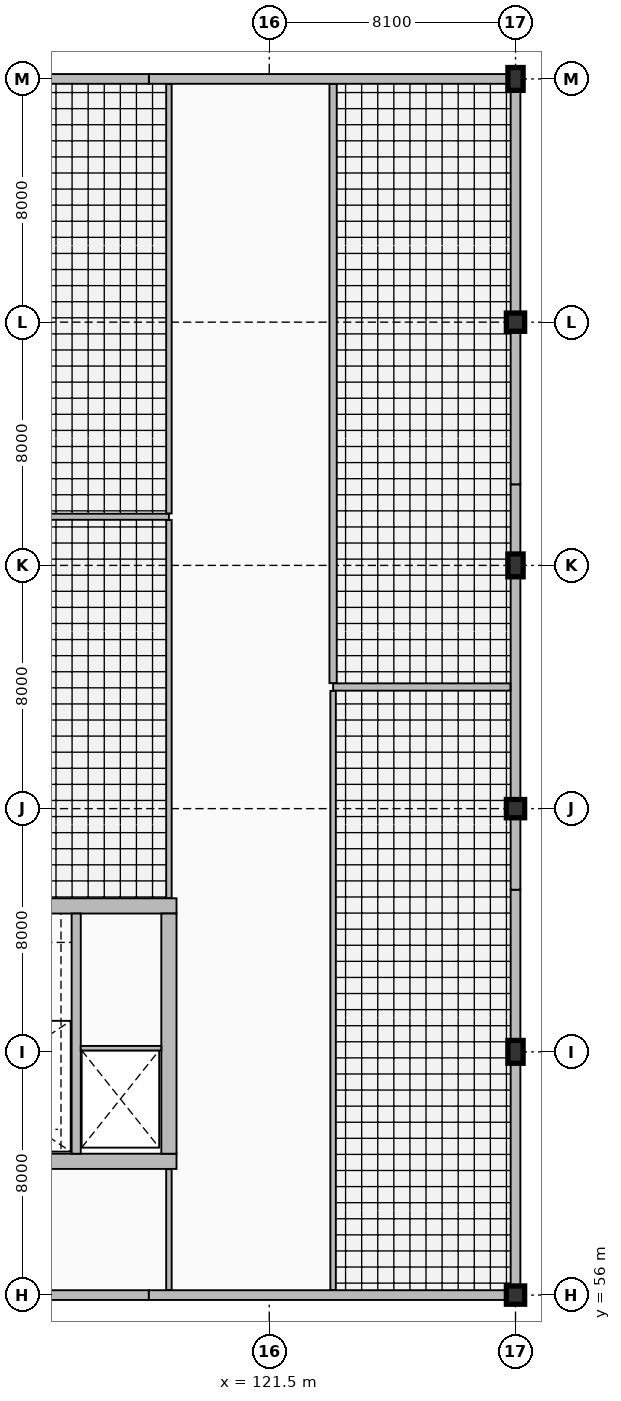
"""IFC4 building model, lengths in metres.
Left out: names, types, materials, properties, quantities, classifications, styles, units other than length and angle.
Written with IfcOpenShell. Run it as: python <this file> out.ifc"""

import sys

from ifc_helpers import new_model, si_unit, direction, frame, frame_2d, origin, origin_2d, place, context, subcontext, project, spatial, rectangle, extrude, element, fill, save


model = new_model("IFC4")
c1 = context("Model", 3, precision=1e-05, world=origin(), true_north=direction((0.0, 1.0)))
c2 = subcontext(c1, "Body", "Model", "MODEL_VIEW")
j1 = project(units=[si_unit("LENGTHUNIT", "METRE"), si_unit("PLANEANGLEUNIT", "RADIAN")], contexts=[c1])
p1 = place(None, origin())
s1 = spatial("IfcSite", under=j1, at=p1, CompositionType="ELEMENT")
p2 = place(p1, origin())
s2 = spatial("IfcBuilding", under=s1, at=p2, CompositionType="ELEMENT")
p3 = place(p2, frame((0.0, 0.0, 10.2)))
s3 = spatial("IfcBuildingStorey", under=s2, at=p3, CompositionType="ELEMENT", Elevation=10.2)
p4 = place(p3, frame((105.48, 60.4, 0.0), z_axis=(0.0, 0.0, 1.0), x_axis=(1.0, 0.0, 0.0)))
e1 = element("IfcWall", 1, at=p4, inside=s3, PredefinedType="SHEAR", context=c2, shape_type="SweptSolid", body=[
    extrude(rectangle(XDim=12.97, YDim=0.5, at=frame_2d((6.485, 0.0))), origin(), (0.0, 0.0, 1.0), 4.5),
])
p5 = place(p4, frame((1.27, 0.0, 0.0)))
e2 = element("IfcOpeningElement", 2, at=p5, cuts=e1, PredefinedType="OPENING", context=c2, shape_type="SweptSolid", body=[
    extrude(rectangle(XDim=1.15, YDim=2.25, at=frame_2d((0.575, 1.125))), frame((0.0, 0.26, 0.0), z_axis=(0.0, -1.0, 0.0), x_axis=(1.0, 0.0, 0.0)), (0.0, 0.0, 1.0), 0.52),
])
p6 = place(p4, frame((10.475, 0.0, 0.0)))
e3 = element("IfcOpeningElement", 3, at=p6, cuts=e1, PredefinedType="OPENING", context=c2, shape_type="SweptSolid", body=[
    extrude(rectangle(XDim=1.3, YDim=2.3, at=frame_2d((0.65, 1.15))), frame((0.0, 0.26, 0.0), z_axis=(0.0, -1.0, 0.0), x_axis=(1.0, 0.0, 0.0)), (0.0, 0.0, 1.0), 0.52),
])
p7 = place(p3, frame((105.48, 68.8, 0.0), z_axis=(0.0, 0.0, 1.0), x_axis=(1.0, 0.0, 0.0)))
e4 = element("IfcWall", 4, at=p7, inside=s3, PredefinedType="SHEAR", context=c2, shape_type="SweptSolid", body=[
    extrude(rectangle(XDim=12.97, YDim=0.5, at=frame_2d((6.485, 0.0))), origin(), (0.0, 0.0, 1.0), 4.5),
])
p8 = place(p3, frame((118.2, 60.65, 0.0), z_axis=(0.0, 0.0, 1.0), x_axis=(0.0, 1.0, 0.0)))
e5 = element("IfcWall", 5, at=p8, inside=s3, PredefinedType="SHEAR", context=c2, shape_type="SweptSolid", body=[
    extrude(rectangle(XDim=7.9, YDim=0.5, at=frame_2d((3.95, 0.0))), origin(), (0.0, 0.0, 1.0), 4.5),
])
p9 = place(p3, frame((115.15, 60.65, 0.0), z_axis=(0.0, 0.0, 1.0), x_axis=(0.0, 1.0, 0.0)))
e6 = element("IfcWall", 6, at=p9, inside=s3, PredefinedType="SHEAR", context=c2, shape_type="SweptSolid", body=[
    extrude(rectangle(XDim=7.9, YDim=0.3, at=frame_2d((3.95, 0.0))), origin(), (0.0, 0.0, 1.0), 4.5),
])
p10 = place(p3, frame((129.6, 56.0, 0.0), z_axis=(0.0, 0.0, 1.0), x_axis=(1.0, 0.0, 0.0)))
e7 = element("IfcColumn", 7, at=p10, inside=s3, PredefinedType="COLUMN", context=c2, shape_type="SweptSolid", body=[
    extrude(rectangle(XDim=0.6, YDim=0.6, at=origin_2d()), origin(), (0.0, 0.0, 1.0), 4.5),
])
p11 = place(p3, frame((129.6, 64.0, 0.0), z_axis=(0.0, 0.0, 1.0), x_axis=(1.0, 0.0, 0.0)))
e8 = element("IfcColumn", 8, at=p11, inside=s3, PredefinedType="COLUMN", context=c2, shape_type="SweptSolid", body=[
    extrude(rectangle(XDim=0.5, YDim=0.75, at=origin_2d()), origin(), (0.0, 0.0, 1.0), 4.5),
])
p12 = place(p3, frame((129.6, 72.0, 0.0), z_axis=(0.0, 0.0, 1.0), x_axis=(1.0, 0.0, 0.0)))
e9 = element("IfcColumn", 9, at=p12, inside=s3, PredefinedType="COLUMN", context=c2, shape_type="SweptSolid", body=[
    extrude(rectangle(XDim=0.6, YDim=0.6, at=origin_2d()), origin(), (0.0, 0.0, 1.0), 4.5),
])
p13 = place(p3, frame((129.6, 80.0, 0.0), z_axis=(0.0, 0.0, 1.0), x_axis=(1.0, 0.0, 0.0)))
e10 = element("IfcColumn", 10, at=p13, inside=s3, PredefinedType="COLUMN", context=c2, shape_type="SweptSolid", body=[
    extrude(rectangle(XDim=0.5, YDim=0.75, at=origin_2d()), origin(), (0.0, 0.0, 1.0), 4.5),
])
p14 = place(p3, frame((129.6, 88.0, 0.0), z_axis=(0.0, 0.0, 1.0), x_axis=(1.0, 0.0, 0.0)))
e11 = element("IfcColumn", 11, at=p14, inside=s3, PredefinedType="COLUMN", context=c2, shape_type="SweptSolid", body=[
    extrude(rectangle(XDim=0.6, YDim=0.6, at=origin_2d()), origin(), (0.0, 0.0, 1.0), 4.5),
])
p15 = place(p3, frame((129.6, 96.0, 0.0), z_axis=(0.0, 0.0, 1.0), x_axis=(1.0, 0.0, 0.0)))
e12 = element("IfcColumn", 12, at=p15, inside=s3, PredefinedType="COLUMN", context=c2, shape_type="SweptSolid", body=[
    extrude(rectangle(XDim=0.5, YDim=0.75, at=origin_2d()), origin(), (0.0, 0.0, 1.0), 4.5),
])
p16 = place(p3, frame((105.48, 56.0, 0.0), z_axis=(0.0, 0.0, 1.0), x_axis=(1.0, 0.0, 0.0)))
e13 = element("IfcWall", 13, at=p16, inside=s3, PredefinedType="SOLIDWALL", context=c2, shape_type="SweptSolid", body=[
    extrude(rectangle(XDim=12.06, YDim=0.32, at=frame_2d((6.03, 0.0))), origin(), (0.0, 0.0, 1.0), 3.544),
])
p17 = place(p16, frame((2.25, 0.0, 0.95)))
e14 = element("IfcOpeningElement", 14, at=p17, cuts=e13, PredefinedType="OPENING", context=c2, shape_type="SweptSolid", body=[
    extrude(rectangle(XDim=3.6, YDim=1.8, at=frame_2d((1.8, 0.9))), frame((0.0, 0.17, 0.0), z_axis=(0.0, -1.0, 0.0), x_axis=(1.0, 0.0, 0.0)), (0.0, 0.0, 1.0), 0.34),
])
p18 = place(p3, frame((117.54, 56.0, 0.0), z_axis=(0.0, 0.0, 1.0), x_axis=(1.0, 0.0, 0.0)))
e15 = element("IfcWall", 15, at=p18, inside=s3, PredefinedType="SOLIDWALL", context=c2, shape_type="SweptSolid", body=[
    extrude(rectangle(XDim=12.06, YDim=0.32, at=frame_2d((6.03, 0.0))), origin(), (0.0, 0.0, 1.0), 3.544),
])
p19 = place(p18, frame((3.6, 0.0, 0.95)))
e16 = element("IfcOpeningElement", 16, at=p19, cuts=e15, PredefinedType="OPENING", context=c2, shape_type="SweptSolid", body=[
    extrude(rectangle(XDim=0.6, YDim=1.8, at=frame_2d((0.3, 0.9))), frame((0.0, 0.17, 0.0), z_axis=(0.0, -1.0, 0.0), x_axis=(1.0, 0.0, 0.0)), (0.0, 0.0, 1.0), 0.34),
])
p20 = place(p3, frame((129.6, 56.0, 0.0), z_axis=(0.0, 0.0, 1.0), x_axis=(0.0, 1.0, 0.0)))
e17 = element("IfcWall", 17, at=p20, inside=s3, PredefinedType="SOLIDWALL", context=c2, shape_type="SweptSolid", body=[
    extrude(rectangle(XDim=13.333, YDim=0.32, at=frame_2d((6.667, 0.0))), origin(), (0.0, 0.0, 1.0), 3.732),
])
p21 = place(p20, frame((4.05, 0.0, 0.85)))
e18 = element("IfcOpeningElement", 18, at=p21, cuts=e17, PredefinedType="OPENING", context=c2, shape_type="SweptSolid", body=[
    extrude(rectangle(XDim=0.75, YDim=2.2, at=frame_2d((0.375, 1.1))), frame((0.0, 0.17, 0.0), z_axis=(0.0, -1.0, 0.0), x_axis=(1.0, 0.0, 0.0)), (0.0, 0.0, 1.0), 0.34),
])
p22 = place(p3, frame((129.6, 69.333, 0.0), z_axis=(0.0, 0.0, 1.0), x_axis=(0.0, 1.0, 0.0)))
e19 = element("IfcWall", 19, at=p22, inside=s3, PredefinedType="SOLIDWALL", context=c2, shape_type="SweptSolid", body=[
    extrude(rectangle(XDim=13.333, YDim=0.32, at=frame_2d((6.667, 0.0))), origin(), (0.0, 0.0, 1.0), 3.732),
])
p23 = place(p3, frame((129.6, 82.667, 0.0), z_axis=(0.0, 0.0, 1.0), x_axis=(0.0, 1.0, 0.0)))
e20 = element("IfcWall", 20, at=p23, inside=s3, PredefinedType="SOLIDWALL", context=c2, shape_type="SweptSolid", body=[
    extrude(rectangle(XDim=13.333, YDim=0.32, at=frame_2d((6.667, 0.0))), origin(), (0.0, 0.0, 1.0), 3.732),
])
p24 = place(p23, frame((7.65, 0.0, 0.95)))
e21 = element("IfcOpeningElement", 21, at=p24, cuts=e20, PredefinedType="OPENING", context=c2, shape_type="SweptSolid", body=[
    extrude(rectangle(XDim=2.7, YDim=0.9, at=frame_2d((1.35, 0.45))), frame((0.0, 0.17, 0.0), z_axis=(0.0, -1.0, 0.0), x_axis=(1.0, 0.0, 0.0)), (0.0, 0.0, 1.0), 0.34),
])
p25 = place(p3, frame((129.6, 96.0, 0.0), z_axis=(0.0, 0.0, 1.0), x_axis=(-1.0, 0.0, 0.0)))
e22 = element("IfcWall", 22, at=p25, inside=s3, PredefinedType="SOLIDWALL", context=c2, shape_type="SweptSolid", body=[
    extrude(rectangle(XDim=12.06, YDim=0.32, at=frame_2d((6.03, 0.0))), origin(), (0.0, 0.0, 1.0), 3.544),
])
p26 = place(p3, frame((117.54, 96.0, 0.0), z_axis=(0.0, 0.0, 1.0), x_axis=(-1.0, 0.0, 0.0)))
e23 = element("IfcWall", 23, at=p26, inside=s3, PredefinedType="SOLIDWALL", context=c2, shape_type="SweptSolid", body=[
    extrude(rectangle(XDim=12.06, YDim=0.32, at=frame_2d((6.03, 0.0))), origin(), (0.0, 0.0, 1.0), 3.544),
])
p27 = place(p26, frame((6.3, 0.0, 0.95)))
e24 = element("IfcOpeningElement", 24, at=p27, cuts=e23, PredefinedType="OPENING", context=c2, shape_type="SweptSolid", body=[
    extrude(rectangle(XDim=3.6, YDim=0.9, at=frame_2d((1.8, 0.45))), frame((0.0, 0.17, 0.0), z_axis=(0.0, -1.0, 0.0), x_axis=(1.0, 0.0, 0.0)), (0.0, 0.0, 1.0), 0.34),
])
p28 = place(p3, frame((115.3, 64.12, 0.0), z_axis=(0.0, 0.0, 1.0), x_axis=(1.0, 0.0, 0.0)))
e25 = element("IfcWall", 25, at=p28, inside=s3, PredefinedType="PARTITIONING", context=c2, shape_type="SweptSolid", body=[
    extrude(rectangle(XDim=2.65, YDim=0.15, at=frame_2d((1.325, 0.0))), origin(), (0.0, 0.0, 1.0), 4.24),
])
p29 = place(p3, frame((111.834, 81.6, 0.0), z_axis=(0.0, 0.0, 1.0), x_axis=(1.0, 0.0, 0.0)))
e26 = element("IfcWall", 26, at=p29, inside=s3, PredefinedType="PARTITIONING", context=c2, shape_type="SweptSolid", body=[
    extrude(rectangle(XDim=6.366, YDim=0.2, at=frame_2d((3.183, 0.0))), origin(), (0.0, 0.0, 1.0), 4.24),
])
p30 = place(p3, frame((123.6, 76.0, 0.0), z_axis=(0.0, 0.0, 1.0), x_axis=(1.0, 0.0, 0.0)))
e27 = element("IfcWall", 27, at=p30, inside=s3, PredefinedType="PARTITIONING", context=c2, shape_type="SweptSolid", body=[
    extrude(rectangle(XDim=5.832, YDim=0.24, at=frame_2d((2.916, 0.0))), origin(), (0.0, 0.0, 1.0), 4.24),
])
p31 = place(p3, frame((118.2, 56.168, 0.0), z_axis=(0.0, 0.0, 1.0), x_axis=(0.0, 1.0, 0.0)))
e28 = element("IfcWall", 28, at=p31, inside=s3, PredefinedType="PARTITIONING", context=c2, shape_type="SweptSolid", body=[
    extrude(rectangle(XDim=3.974, YDim=0.18, at=frame_2d((1.987, 0.0))), origin(), (0.0, 0.0, 1.0), 4.24),
])
p32 = place(p31, frame((1.387, 0.0, 0.0)))
e29 = element("IfcOpeningElement", 29, at=p32, cuts=e28, PredefinedType="OPENING", context=c2, shape_type="SweptSolid", body=[
    extrude(rectangle(XDim=1.2, YDim=2.2, at=frame_2d((0.6, 1.1))), frame((0.0, 0.1, 0.0), z_axis=(0.0, -1.0, 0.0), x_axis=(1.0, 0.0, 0.0)), (0.0, 0.0, 1.0), 0.2),
])
p33 = place(p3, frame((118.2, 69.058, 0.0), z_axis=(0.0, 0.0, 1.0), x_axis=(0.0, 1.0, 0.0)))
e30 = element("IfcWall", 30, at=p33, inside=s3, PredefinedType="PARTITIONING", context=c2, shape_type="SweptSolid", body=[
    extrude(rectangle(XDim=12.434, YDim=0.18, at=frame_2d((6.217, 0.0))), origin(), (0.0, 0.0, 1.0), 4.24),
])
p34 = place(p33, frame((5.667, 0.0, 0.0)))
e31 = element("IfcOpeningElement", 31, at=p34, cuts=e30, PredefinedType="OPENING", context=c2, shape_type="SweptSolid", body=[
    extrude(rectangle(XDim=1.1, YDim=2.2, at=frame_2d((0.55, 1.1))), frame((0.0, 0.1, 0.0), z_axis=(0.0, -1.0, 0.0), x_axis=(1.0, 0.0, 0.0)), (0.0, 0.0, 1.0), 0.2),
])
p35 = place(p3, frame((118.2, 81.708, 0.0), z_axis=(0.0, 0.0, 1.0), x_axis=(0.0, 1.0, 0.0)))
e32 = element("IfcWall", 32, at=p35, inside=s3, PredefinedType="PARTITIONING", context=c2, shape_type="SweptSolid", body=[
    extrude(rectangle(XDim=14.124, YDim=0.18, at=frame_2d((7.062, 0.0))), origin(), (0.0, 0.0, 1.0), 4.24),
])
p36 = place(p35, frame((6.512, 0.0, 0.0)))
e33 = element("IfcOpeningElement", 33, at=p36, cuts=e32, PredefinedType="OPENING", context=c2, shape_type="SweptSolid", body=[
    extrude(rectangle(XDim=1.1, YDim=2.2, at=frame_2d((0.55, 1.1))), frame((0.0, 0.1, 0.0), z_axis=(0.0, -1.0, 0.0), x_axis=(1.0, 0.0, 0.0)), (0.0, 0.0, 1.0), 0.2),
])
p37 = place(p3, frame((123.6, 56.168, 0.0), z_axis=(0.0, 0.0, 1.0), x_axis=(0.0, 1.0, 0.0)))
e34 = element("IfcWall", 34, at=p37, inside=s3, PredefinedType="PARTITIONING", context=c2, shape_type="SweptSolid", body=[
    extrude(rectangle(XDim=19.704, YDim=0.18, at=frame_2d((9.852, 0.0))), origin(), (0.0, 0.0, 1.0), 4.24),
])
p38 = place(p37, frame((9.102, 0.0, 0.0)))
e35 = element("IfcOpeningElement", 35, at=p38, cuts=e34, PredefinedType="OPENING", context=c2, shape_type="SweptSolid", body=[
    extrude(rectangle(XDim=1.5, YDim=2.3, at=frame_2d((0.75, 1.15))), frame((0.0, 0.1, 0.0), z_axis=(0.0, -1.0, 0.0), x_axis=(1.0, 0.0, 0.0)), (0.0, 0.0, 1.0), 0.2),
])
p39 = place(p3, frame((123.6, 76.128, 0.0), z_axis=(0.0, 0.0, 1.0), x_axis=(0.0, 1.0, 0.0)))
e36 = element("IfcWall", 36, at=p39, inside=s3, PredefinedType="PARTITIONING", context=c2, shape_type="SweptSolid", body=[
    extrude(rectangle(XDim=19.704, YDim=0.24, at=frame_2d((9.852, 0.0))), origin(), (0.0, 0.0, 1.0), 4.24),
])
p40 = place(p39, frame((9.302, 0.0, 0.0)))
e37 = element("IfcOpeningElement", 37, at=p40, cuts=e36, PredefinedType="OPENING", context=c2, shape_type="SweptSolid", body=[
    extrude(rectangle(XDim=1.1, YDim=2.25, at=frame_2d((0.55, 1.125))), frame((0.0, 0.13, 0.0), z_axis=(0.0, -1.0, 0.0), x_axis=(1.0, 0.0, 0.0)), (0.0, 0.0, 1.0), 0.26),
])
p41 = place(p19, origin())
e38 = element("IfcWindow", 38, at=p41, inside=s3, PartitioningType="SINGLE_PANEL", PredefinedType="WINDOW", context=c2, shape_type="SweptSolid", body=[
    extrude(rectangle(XDim=0.6, YDim=1.8, at=frame_2d((0.3, 0.9))), frame((0.0, 0.03, 0.0), z_axis=(0.0, -1.0, 0.0), x_axis=(1.0, 0.0, 0.0)), (0.0, 0.0, 1.0), 0.06),
])
fill(e16, e38)
p42 = place(p21, origin())
e39 = element("IfcWindow", 39, at=p42, inside=s3, PartitioningType="SINGLE_PANEL", PredefinedType="WINDOW", context=c2, shape_type="SweptSolid", body=[
    extrude(rectangle(XDim=0.75, YDim=2.2, at=frame_2d((0.375, 1.1))), frame((0.0, 0.03, 0.0), z_axis=(0.0, -1.0, 0.0), x_axis=(1.0, 0.0, 0.0)), (0.0, 0.0, 1.0), 0.06),
])
fill(e18, e39)
p43 = place(p24, origin())
e40 = element("IfcWindow", 40, at=p43, inside=s3, PartitioningType="TRIPLE_PANEL_VERTICAL", PredefinedType="WINDOW", context=c2, shape_type="SweptSolid", body=[
    extrude(rectangle(XDim=2.7, YDim=0.9, at=frame_2d((1.35, 0.45))), frame((0.0, 0.03, 0.0), z_axis=(0.0, -1.0, 0.0), x_axis=(1.0, 0.0, 0.0)), (0.0, 0.0, 1.0), 0.06),
])
fill(e21, e40)
p44 = place(p6, frame((1.3, 0.0, 0.0), z_axis=(0.0, 0.0, 1.0), x_axis=(-1.0, 0.0, 0.0)))
e41 = element("IfcDoor", 41, at=p44, inside=s3, OperationType="DOUBLE_DOOR_SLIDING", PredefinedType="DOOR", context=c2, shape_type="SweptSolid", body=[
    extrude(rectangle(XDim=1.3, YDim=2.3, at=frame_2d((0.65, 1.15))), frame((0.0, 0.025, 0.0), z_axis=(0.0, -1.0, 0.0), x_axis=(1.0, 0.0, 0.0)), (0.0, 0.0, 1.0), 0.05),
])
fill(e3, e41)
p45 = place(p32, frame((1.2, 0.0, 0.0), z_axis=(0.0, 0.0, 1.0), x_axis=(-1.0, 0.0, 0.0)))
e42 = element("IfcDoor", 42, at=p45, inside=s3, OperationType="SINGLE_SWING_LEFT", PredefinedType="DOOR", context=c2, shape_type="SweptSolid", body=[
    extrude(rectangle(XDim=1.2, YDim=2.2, at=frame_2d((0.6, 1.1))), frame((0.0, 0.025, 0.0), z_axis=(0.0, -1.0, 0.0), x_axis=(1.0, 0.0, 0.0)), (0.0, 0.0, 1.0), 0.05),
])
fill(e29, e42)
p46 = place(p34, origin())
e43 = element("IfcDoor", 43, at=p46, inside=s3, OperationType="SINGLE_SWING_RIGHT", PredefinedType="DOOR", context=c2, shape_type="SweptSolid", body=[
    extrude(rectangle(XDim=1.1, YDim=2.2, at=frame_2d((0.55, 1.1))), frame((0.0, 0.025, 0.0), z_axis=(0.0, -1.0, 0.0), x_axis=(1.0, 0.0, 0.0)), (0.0, 0.0, 1.0), 0.05),
])
fill(e31, e43)
p47 = place(p36, origin())
e44 = element("IfcDoor", 44, at=p47, inside=s3, OperationType="SINGLE_SWING_LEFT", PredefinedType="DOOR", context=c2, shape_type="SweptSolid", body=[
    extrude(rectangle(XDim=1.1, YDim=2.2, at=frame_2d((0.55, 1.1))), frame((0.0, 0.025, 0.0), z_axis=(0.0, -1.0, 0.0), x_axis=(1.0, 0.0, 0.0)), (0.0, 0.0, 1.0), 0.05),
])
fill(e33, e44)
p48 = place(p38, frame((1.5, 0.0, 0.0), z_axis=(0.0, 0.0, 1.0), x_axis=(-1.0, 0.0, 0.0)))
e45 = element("IfcDoor", 45, at=p48, inside=s3, OperationType="DOUBLE_DOOR_SINGLE_SWING", PredefinedType="DOOR", context=c2, shape_type="SweptSolid", body=[
    extrude(rectangle(XDim=1.5, YDim=2.3, at=frame_2d((0.75, 1.15))), frame((0.0, 0.025, 0.0), z_axis=(0.0, -1.0, 0.0), x_axis=(1.0, 0.0, 0.0)), (0.0, 0.0, 1.0), 0.05),
])
fill(e35, e45)
p49 = place(p40, frame((1.1, 0.0, 0.0), z_axis=(0.0, 0.0, 1.0), x_axis=(-1.0, 0.0, 0.0)))
e46 = element("IfcDoor", 46, at=p49, inside=s3, OperationType="SINGLE_SWING_RIGHT", PredefinedType="DOOR", context=c2, shape_type="SweptSolid", body=[
    extrude(rectangle(XDim=1.1, YDim=2.25, at=frame_2d((0.55, 1.125))), frame((0.0, 0.025, 0.0), z_axis=(0.0, -1.0, 0.0), x_axis=(1.0, 0.0, 0.0)), (0.0, 0.0, 1.0), 0.05),
])
fill(e37, e46)
save(model, sys.argv[1])
